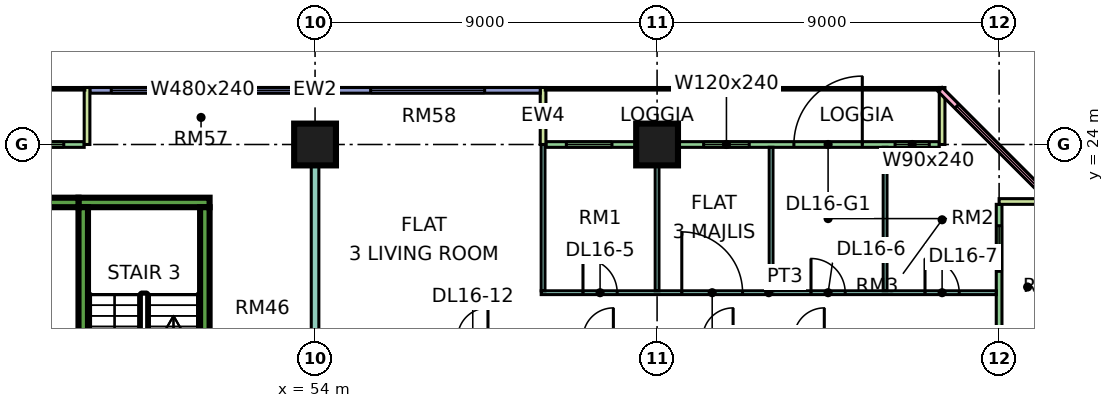
"""IFC4 building model, lengths in metres.
Left out: names, types, materials, properties, quantities, classifications, styles, units other than length and angle.
Written with IfcOpenShell. Run it as: python <this file> out.ifc"""

import sys

from ifc_helpers import new_model, si_unit, direction, frame, frame_2d, origin, origin_2d, place, context, subcontext, project, spatial, rectangle, extrude, element, fill, save


model = new_model("IFC4")
c1 = context("Model", 3, precision=1e-05, world=origin(), true_north=direction((0.0, 1.0)))
c2 = subcontext(c1, "Body", "Model", "MODEL_VIEW")
j1 = project(units=[si_unit("LENGTHUNIT", "METRE"), si_unit("PLANEANGLEUNIT", "RADIAN")], contexts=[c1])
p1 = place(None, origin())
s1 = spatial("IfcSite", under=j1, at=p1, CompositionType="ELEMENT")
p2 = place(p1, origin())
s2 = spatial("IfcBuilding", under=s1, at=p2, CompositionType="ELEMENT")
p3 = place(p2, frame((0.0, 0.0, 75.15)))
s3 = spatial("IfcBuildingStorey", under=s2, at=p3, CompositionType="ELEMENT", Elevation=75.15)
for number, where, z_axis, x_axis in (
    (1, (54.0, 24.0, 0.0), (0.0, 0.0, 1.0), (1.0, 0.0, 0.0)),
    (2, (63.0, 24.0, 0.0), (0.0, 0.0, 1.0), (1.0, 0.0, 0.0)),
):
    element("IfcColumn", number, at=place(p3, frame(where, z_axis=z_axis, x_axis=x_axis)), inside=s3, PredefinedType="COLUMN", context=c2, shape_type="SweptSolid", body=[
        extrude(rectangle(XDim=1.1, YDim=1.1, at=origin_2d()), origin(), (0.0, 0.0, 1.0), 3.75),
    ])
p4 = place(p3, frame((47.775, 22.475, 0.0), z_axis=(0.0, 0.0, 1.0), x_axis=(1.0, 0.0, 0.0)))
e3 = element("IfcWall", 3, at=p4, inside=s3, PredefinedType="SHEAR", context=c2, shape_type="SweptSolid", body=[
    extrude(rectangle(XDim=3.45, YDim=0.25, at=frame_2d((1.725, 0.0))), origin(), (0.0, 0.0, 1.0), 3.75),
])
p5 = place(p3, frame((47.9, 15.85, 0.0), z_axis=(0.0, 0.0, 1.0), x_axis=(0.0, 1.0, 0.0)))
e4 = element("IfcWall", 4, at=p5, inside=s3, PredefinedType="SHEAR", context=c2, shape_type="SweptSolid", body=[
    extrude(rectangle(XDim=6.5, YDim=0.25, at=frame_2d((3.25, 0.0))), origin(), (0.0, 0.0, 1.0), 3.75),
])
p6 = place(p5, frame((0.35, 0.0, 0.0)))
e5 = element("IfcOpeningElement", 5, at=p6, cuts=e4, PredefinedType="OPENING", context=c2, shape_type="SweptSolid", body=[
    extrude(rectangle(XDim=1.1, YDim=2.2, at=frame_2d((0.55, 1.1))), frame((0.0, 0.135, 0.0), z_axis=(0.0, -1.0, 0.0), x_axis=(1.0, 0.0, 0.0)), (0.0, 0.0, 1.0), 0.27),
])
p7 = place(p3, frame((51.1, 15.85, 0.0), z_axis=(0.0, 0.0, 1.0), x_axis=(0.0, 1.0, 0.0)))
e6 = element("IfcWall", 6, at=p7, inside=s3, PredefinedType="SHEAR", context=c2, shape_type="SweptSolid", body=[
    extrude(rectangle(XDim=6.5, YDim=0.25, at=frame_2d((3.25, 0.0))), origin(), (0.0, 0.0, 1.0), 3.75),
])
p8 = place(p3, frame((44.35, 22.475, 0.0), z_axis=(0.0, 0.0, 1.0), x_axis=(1.0, 0.0, 0.0)))
e7 = element("IfcWall", 7, at=p8, inside=s3, PredefinedType="SHEAR", context=c2, shape_type="SweptSolid", body=[
    extrude(rectangle(XDim=3.425, YDim=0.25, at=frame_2d((1.712, 0.0))), origin(), (0.0, 0.0, 1.0), 3.75),
])
p9 = place(p3, frame((70.425, 24.0, 0.0), z_axis=(0.0, 0.0, 1.0), x_axis=(-1.0, 0.0, 0.0)))
e8 = element("IfcWall", 8, at=p9, inside=s3, PredefinedType="SOLIDWALL", context=c2, shape_type="SweptSolid", body=[
    extrude(rectangle(XDim=10.35, YDim=0.15, at=frame_2d((5.175, 0.0))), origin(), (0.0, 0.0, 1.0), 3.35),
])
p10 = place(p9, frame((0.262, 0.0, 0.45)))
e9 = element("IfcOpeningElement", 9, at=p10, cuts=e8, PredefinedType="OPENING", context=c2, shape_type="SweptSolid", body=[
    extrude(rectangle(XDim=0.9, YDim=2.4, at=frame_2d((0.45, 1.2))), frame((0.0, 0.085, 0.0), z_axis=(0.0, -1.0, 0.0), x_axis=(1.0, 0.0, 0.0)), (0.0, 0.0, 1.0), 0.17),
])
p11 = place(p9, frame((2.025, 0.0, 0.0)))
e10 = element("IfcOpeningElement", 10, at=p11, cuts=e8, PredefinedType="OPENING", context=c2, shape_type="SweptSolid", body=[
    extrude(rectangle(XDim=1.8, YDim=2.4, at=frame_2d((0.9, 1.2))), frame((0.0, 0.085, 0.0), z_axis=(0.0, -1.0, 0.0), x_axis=(1.0, 0.0, 0.0)), (0.0, 0.0, 1.0), 0.17),
])
p12 = place(p9, frame((5.0, 0.0, 0.45)))
e11 = element("IfcOpeningElement", 11, at=p12, cuts=e8, PredefinedType="OPENING", context=c2, shape_type="SweptSolid", body=[
    extrude(rectangle(XDim=1.2, YDim=2.4, at=frame_2d((0.6, 1.2))), frame((0.0, 0.085, 0.0), z_axis=(0.0, -1.0, 0.0), x_axis=(1.0, 0.0, 0.0)), (0.0, 0.0, 1.0), 0.17),
])
p13 = place(p9, frame((8.613, 0.0, 0.45)))
e12 = element("IfcOpeningElement", 12, at=p13, cuts=e8, PredefinedType="OPENING", context=c2, shape_type="SweptSolid", body=[
    extrude(rectangle(XDim=1.2, YDim=2.4, at=frame_2d((0.6, 1.2))), frame((0.0, 0.085, 0.0), z_axis=(0.0, -1.0, 0.0), x_axis=(1.0, 0.0, 0.0)), (0.0, 0.0, 1.0), 0.17),
])
for number, where, z_axis, x_axis in (
    (13, (70.5, 25.5, 0.0), (0.0, 0.0, 1.0), (0.0, -1.0, 0.0)),
    (14, (60.0, 25.5, 0.0), (0.0, 0.0, 1.0), (0.0, -1.0, 0.0)),
):
    element("IfcWall", number, at=place(p3, frame(where, z_axis=z_axis, x_axis=x_axis)), inside=s3, PredefinedType="SOLIDWALL", context=c2, shape_type="SweptSolid", body=[
        extrude(rectangle(XDim=1.5, YDim=0.15, at=frame_2d((0.75, 0.0))), origin(), (0.0, 0.0, 1.0), 3.35),
    ])
p14 = place(p3, frame((59.925, 25.425, 0.0), z_axis=(0.0, 0.0, 1.0), x_axis=(-1.0, 0.0, 0.0)))
e15 = element("IfcWall", 15, at=p14, inside=s3, PredefinedType="SOLIDWALL", context=c2, shape_type="SweptSolid", body=[
    extrude(rectangle(XDim=11.85, YDim=0.15, at=frame_2d((5.925, 0.0))), origin(), (0.0, 0.0, 1.0), 3.35),
])
p15 = place(p14, frame((1.462, 0.0, 0.45)))
e16 = element("IfcOpeningElement", 16, at=p15, cuts=e15, PredefinedType="OPENING", context=c2, shape_type="SweptSolid", body=[
    extrude(rectangle(XDim=3.0, YDim=2.4, at=frame_2d((1.5, 1.2))), frame((0.0, 0.085, 0.0), z_axis=(0.0, -1.0, 0.0), x_axis=(1.0, 0.0, 0.0)), (0.0, 0.0, 1.0), 0.17),
])
p16 = place(p14, frame((6.488, 0.0, 0.45)))
e17 = element("IfcOpeningElement", 17, at=p16, cuts=e15, PredefinedType="OPENING", context=c2, shape_type="SweptSolid", body=[
    extrude(rectangle(XDim=4.8, YDim=2.4, at=frame_2d((2.4, 1.2))), frame((0.0, 0.085, 0.0), z_axis=(0.0, -1.0, 0.0), x_axis=(1.0, 0.0, 0.0)), (0.0, 0.0, 1.0), 0.17),
])
p17 = place(p3, frame((47.925, 24.0, 0.0), z_axis=(0.0, 0.0, 1.0), x_axis=(-1.0, 0.0, 0.0)))
e18 = element("IfcWall", 18, at=p17, inside=s3, PredefinedType="SOLIDWALL", context=c2, shape_type="SweptSolid", body=[
    extrude(rectangle(XDim=7.35, YDim=0.15, at=frame_2d((3.675, 0.0))), origin(), (0.0, 0.0, 1.0), 3.35),
])
p18 = place(p17, frame((0.538, 0.0, 0.45)))
e19 = element("IfcOpeningElement", 19, at=p18, cuts=e18, PredefinedType="OPENING", context=c2, shape_type="SweptSolid", body=[
    extrude(rectangle(XDim=1.2, YDim=2.4, at=frame_2d((0.6, 1.2))), frame((0.0, 0.085, 0.0), z_axis=(0.0, -1.0, 0.0), x_axis=(1.0, 0.0, 0.0)), (0.0, 0.0, 1.0), 0.17),
])
p19 = place(p17, frame((3.962, 0.0, 0.45)))
e20 = element("IfcOpeningElement", 20, at=p19, cuts=e18, PredefinedType="OPENING", context=c2, shape_type="SweptSolid", body=[
    extrude(rectangle(XDim=3.0, YDim=2.4, at=frame_2d((1.5, 1.2))), frame((0.0, 0.085, 0.0), z_axis=(0.0, -1.0, 0.0), x_axis=(1.0, 0.0, 0.0)), (0.0, 0.0, 1.0), 0.17),
])
p20 = place(p3, frame((48.0, 25.5, 0.0), z_axis=(0.0, 0.0, 1.0), x_axis=(0.0, -1.0, 0.0)))
e21 = element("IfcWall", 21, at=p20, inside=s3, PredefinedType="SOLIDWALL", context=c2, shape_type="SweptSolid", body=[
    extrude(rectangle(XDim=1.5, YDim=0.15, at=frame_2d((0.75, 0.0))), origin(), (0.0, 0.0, 1.0), 3.35),
])
p21 = place(p3, frame((72.0, 12.075, 0.0), z_axis=(0.0, 0.0, 1.0), x_axis=(0.0, 1.0, 0.0)))
e22 = element("IfcWall", 22, at=p21, inside=s3, PredefinedType="SOLIDWALL", context=c2, shape_type="SweptSolid", body=[
    extrude(rectangle(XDim=10.35, YDim=0.15, at=frame_2d((5.175, 0.0))), origin(), (0.0, 0.0, 1.0), 3.35),
])
p22 = place(p21, frame((3.975, 0.0, 0.45)))
e23 = element("IfcOpeningElement", 23, at=p22, cuts=e22, PredefinedType="OPENING", context=c2, shape_type="SweptSolid", body=[
    extrude(rectangle(XDim=2.4, YDim=2.4, at=frame_2d((1.2, 1.2))), frame((0.0, 0.085, 0.0), z_axis=(0.0, -1.0, 0.0), x_axis=(1.0, 0.0, 0.0)), (0.0, 0.0, 1.0), 0.17),
])
p23 = place(p21, frame((8.587, 0.0, 0.45)))
e24 = element("IfcOpeningElement", 24, at=p23, cuts=e22, PredefinedType="OPENING", context=c2, shape_type="SweptSolid", body=[
    extrude(rectangle(XDim=1.2, YDim=2.4, at=frame_2d((0.6, 1.2))), frame((0.0, 0.085, 0.0), z_axis=(0.0, -1.0, 0.0), x_axis=(1.0, 0.0, 0.0)), (0.0, 0.0, 1.0), 0.17),
])
p24 = place(p3, frame((73.5, 22.5, 0.0), z_axis=(0.0, 0.0, 1.0), x_axis=(-1.0, 0.0, 0.0)))
e25 = element("IfcWall", 25, at=p24, inside=s3, PredefinedType="SOLIDWALL", context=c2, shape_type="SweptSolid", body=[
    extrude(rectangle(XDim=1.5, YDim=0.15, at=frame_2d((0.75, 0.0))), origin(), (0.0, 0.0, 1.0), 3.35),
])
p25 = place(p3, frame((73.447, 22.447, 0.0), z_axis=(0.0, 0.0, 1.0), x_axis=(-0.707106781187, 0.707106781187, 0.0)))
e26 = element("IfcWall", 26, at=p25, inside=s3, PredefinedType="SOLIDWALL", context=c2, shape_type="SweptSolid", body=[
    extrude(rectangle(XDim=4.243, YDim=0.15, at=frame_2d((2.121, 0.0))), origin(), (0.0, 0.0, 1.0), 3.35),
])
p26 = place(p25, frame((0.621, 0.0, 0.45)))
e27 = element("IfcOpeningElement", 27, at=p26, cuts=e26, PredefinedType="OPENING", context=c2, shape_type="SweptSolid", body=[
    extrude(rectangle(XDim=3.0, YDim=2.4, at=frame_2d((1.5, 1.2))), frame((0.0, 0.085, 0.0), z_axis=(0.0, -1.0, 0.0), x_axis=(1.0, 0.0, 0.0)), (0.0, 0.0, 1.0), 0.17),
])
p27 = place(p3, frame((54.0, 15.7, 0.0), z_axis=(0.0, 0.0, 1.0), x_axis=(0.0, 1.0, 0.0)))
e28 = element("IfcWall", 28, at=p27, inside=s3, PredefinedType="PARTITIONING", context=c2, shape_type="SweptSolid", body=[
    extrude(rectangle(XDim=8.3, YDim=0.2, at=frame_2d((4.15, 0.0))), origin(), (0.0, 0.0, 1.0), 3.35),
])
p28 = place(p3, frame((59.95, 20.1, 0.0), z_axis=(0.0, 0.0, 1.0), x_axis=(1.0, 0.0, 0.0)))
e29 = element("IfcWall", 29, at=p28, inside=s3, PredefinedType="PARTITIONING", context=c2, shape_type="SweptSolid", body=[
    extrude(rectangle(XDim=11.976, YDim=0.1, at=frame_2d((5.988, 0.0))), origin(), (0.0, 0.0, 1.0), 3.35),
])
p29 = place(p28, frame((1.1, 0.0, 0.0)))
e30 = element("IfcOpeningElement", 30, at=p29, cuts=e29, PredefinedType="OPENING", context=c2, shape_type="SweptSolid", body=[
    extrude(rectangle(XDim=0.9, YDim=2.1, at=frame_2d((0.45, 1.05))), frame((0.0, 0.06, 0.0), z_axis=(0.0, -1.0, 0.0), x_axis=(1.0, 0.0, 0.0)), (0.0, 0.0, 1.0), 0.12),
])
p30 = place(p28, frame((7.1, 0.0, 0.0)))
e31 = element("IfcOpeningElement", 31, at=p30, cuts=e29, PredefinedType="OPENING", context=c2, shape_type="SweptSolid", body=[
    extrude(rectangle(XDim=0.9, YDim=2.1, at=frame_2d((0.45, 1.05))), frame((0.0, 0.06, 0.0), z_axis=(0.0, -1.0, 0.0), x_axis=(1.0, 0.0, 0.0)), (0.0, 0.0, 1.0), 0.12),
])
p31 = place(p28, frame((10.1, 0.0, 0.0)))
e32 = element("IfcOpeningElement", 32, at=p31, cuts=e29, PredefinedType="OPENING", context=c2, shape_type="SweptSolid", body=[
    extrude(rectangle(XDim=0.9, YDim=2.1, at=frame_2d((0.45, 1.05))), frame((0.0, 0.06, 0.0), z_axis=(0.0, -1.0, 0.0), x_axis=(1.0, 0.0, 0.0)), (0.0, 0.0, 1.0), 0.12),
])
p32 = place(p28, frame((3.7, 0.0, 0.0)))
e33 = element("IfcOpeningElement", 33, at=p32, cuts=e29, PredefinedType="OPENING", context=c2, shape_type="SweptSolid", body=[
    extrude(rectangle(XDim=1.6, YDim=2.1, at=frame_2d((0.8, 1.05))), frame((0.0, 0.06, 0.0), z_axis=(0.0, -1.0, 0.0), x_axis=(1.0, 0.0, 0.0)), (0.0, 0.0, 1.0), 0.12),
])
p33 = place(p3, frame((60.0, 20.15, 0.0), z_axis=(0.0, 0.0, 1.0), x_axis=(0.0, 1.0, 0.0)))
e34 = element("IfcWall", 34, at=p33, inside=s3, PredefinedType="PARTITIONING", context=c2, shape_type="SweptSolid", body=[
    extrude(rectangle(XDim=3.85, YDim=0.1, at=frame_2d((1.925, 0.0))), origin(), (0.0, 0.0, 1.0), 3.35),
])
for number, where, z_axis, x_axis in (
    (35, (63.0, 20.15, 0.0), (0.0, 0.0, 1.0), (0.0, 1.0, 0.0)),
    (36, (66.0, 20.15, 0.0), (0.0, 0.0, 1.0), (0.0, 1.0, 0.0)),
    (37, (69.0, 20.15, 0.0), (0.0, 0.0, 1.0), (0.0, 1.0, 0.0)),
):
    element("IfcWall", number, at=place(p3, frame(where, z_axis=z_axis, x_axis=x_axis)), inside=s3, PredefinedType="PARTITIONING", context=c2, shape_type="SweptSolid", body=[
        extrude(rectangle(XDim=3.776, YDim=0.1, at=frame_2d((1.888, 0.0))), origin(), (0.0, 0.0, 1.0), 3.35),
    ])
p34 = place(p10, origin())
e38 = element("IfcWindow", 38, at=p34, inside=s3, PartitioningType="SINGLE_PANEL", PredefinedType="WINDOW", context=c2, shape_type="SweptSolid", body=[
    extrude(rectangle(XDim=0.9, YDim=2.4, at=frame_2d((0.45, 1.2))), frame((0.0, 0.03, 0.0), z_axis=(0.0, -1.0, 0.0), x_axis=(1.0, 0.0, 0.0)), (0.0, 0.0, 1.0), 0.06),
])
fill(e9, e38)
p35 = place(p11, frame((1.8, 0.0, 0.0), z_axis=(0.0, 0.0, 1.0), x_axis=(-1.0, 0.0, 0.0)))
e39 = element("IfcDoor", 39, at=p35, inside=s3, OperationType="DOUBLE_DOOR_SINGLE_SWING", PredefinedType="DOOR", context=c2, shape_type="SweptSolid", body=[
    extrude(rectangle(XDim=1.8, YDim=2.4, at=frame_2d((0.9, 1.2))), frame((0.0, 0.025, 0.0), z_axis=(0.0, -1.0, 0.0), x_axis=(1.0, 0.0, 0.0)), (0.0, 0.0, 1.0), 0.05),
])
fill(e10, e39)
p36 = place(p12, origin())
e40 = element("IfcWindow", 40, at=p36, inside=s3, PartitioningType="SINGLE_PANEL", PredefinedType="WINDOW", context=c2, shape_type="SweptSolid", body=[
    extrude(rectangle(XDim=1.2, YDim=2.4, at=frame_2d((0.6, 1.2))), frame((0.0, 0.03, 0.0), z_axis=(0.0, -1.0, 0.0), x_axis=(1.0, 0.0, 0.0)), (0.0, 0.0, 1.0), 0.06),
])
fill(e11, e40)
p37 = place(p13, origin())
e41 = element("IfcWindow", 41, at=p37, inside=s3, PartitioningType="SINGLE_PANEL", PredefinedType="WINDOW", context=c2, shape_type="SweptSolid", body=[
    extrude(rectangle(XDim=1.2, YDim=2.4, at=frame_2d((0.6, 1.2))), frame((0.0, 0.03, 0.0), z_axis=(0.0, -1.0, 0.0), x_axis=(1.0, 0.0, 0.0)), (0.0, 0.0, 1.0), 0.06),
])
fill(e12, e41)
p38 = place(p15, origin())
e42 = element("IfcWindow", 42, at=p38, inside=s3, PartitioningType="SINGLE_PANEL", PredefinedType="WINDOW", context=c2, shape_type="SweptSolid", body=[
    extrude(rectangle(XDim=3.0, YDim=2.4, at=frame_2d((1.5, 1.2))), frame((0.0, 0.03, 0.0), z_axis=(0.0, -1.0, 0.0), x_axis=(1.0, 0.0, 0.0)), (0.0, 0.0, 1.0), 0.06),
])
fill(e16, e42)
p39 = place(p16, origin())
e43 = element("IfcWindow", 43, at=p39, inside=s3, PartitioningType="SINGLE_PANEL", PredefinedType="WINDOW", context=c2, shape_type="SweptSolid", body=[
    extrude(rectangle(XDim=4.8, YDim=2.4, at=frame_2d((2.4, 1.2))), frame((0.0, 0.03, 0.0), z_axis=(0.0, -1.0, 0.0), x_axis=(1.0, 0.0, 0.0)), (0.0, 0.0, 1.0), 0.06),
])
fill(e17, e43)
p40 = place(p18, origin())
e44 = element("IfcWindow", 44, at=p40, inside=s3, PartitioningType="SINGLE_PANEL", PredefinedType="WINDOW", context=c2, shape_type="SweptSolid", body=[
    extrude(rectangle(XDim=1.2, YDim=2.4, at=frame_2d((0.6, 1.2))), frame((0.0, 0.03, 0.0), z_axis=(0.0, -1.0, 0.0), x_axis=(1.0, 0.0, 0.0)), (0.0, 0.0, 1.0), 0.06),
])
fill(e19, e44)
p41 = place(p23, origin())
e45 = element("IfcWindow", 45, at=p41, inside=s3, PartitioningType="SINGLE_PANEL", PredefinedType="WINDOW", context=c2, shape_type="SweptSolid", body=[
    extrude(rectangle(XDim=1.2, YDim=2.4, at=frame_2d((0.6, 1.2))), frame((0.0, 0.03, 0.0), z_axis=(0.0, -1.0, 0.0), x_axis=(1.0, 0.0, 0.0)), (0.0, 0.0, 1.0), 0.06),
])
fill(e24, e45)
p42 = place(p26, origin())
e46 = element("IfcWindow", 46, at=p42, inside=s3, PartitioningType="SINGLE_PANEL", PredefinedType="WINDOW", context=c2, shape_type="SweptSolid", body=[
    extrude(rectangle(XDim=3.0, YDim=2.4, at=frame_2d((1.5, 1.2))), frame((0.0, 0.03, 0.0), z_axis=(0.0, -1.0, 0.0), x_axis=(1.0, 0.0, 0.0)), (0.0, 0.0, 1.0), 0.06),
])
fill(e27, e46)
p43 = place(p29, origin())
e47 = element("IfcDoor", 47, at=p43, inside=s3, OperationType="SINGLE_SWING_LEFT", PredefinedType="DOOR", context=c2, shape_type="SweptSolid", body=[
    extrude(rectangle(XDim=0.9, YDim=2.1, at=frame_2d((0.45, 1.05))), frame((0.0, 0.025, 0.0), z_axis=(0.0, -1.0, 0.0), x_axis=(1.0, 0.0, 0.0)), (0.0, 0.0, 1.0), 0.05),
])
fill(e30, e47)
p44 = place(p30, origin())
e48 = element("IfcDoor", 48, at=p44, inside=s3, OperationType="SINGLE_SWING_LEFT", PredefinedType="DOOR", context=c2, shape_type="SweptSolid", body=[
    extrude(rectangle(XDim=0.9, YDim=2.1, at=frame_2d((0.45, 1.05))), frame((0.0, 0.025, 0.0), z_axis=(0.0, -1.0, 0.0), x_axis=(1.0, 0.0, 0.0)), (0.0, 0.0, 1.0), 0.05),
])
fill(e31, e48)
p45 = place(p31, origin())
e49 = element("IfcDoor", 49, at=p45, inside=s3, OperationType="SINGLE_SWING_LEFT", PredefinedType="DOOR", context=c2, shape_type="SweptSolid", body=[
    extrude(rectangle(XDim=0.9, YDim=2.1, at=frame_2d((0.45, 1.05))), frame((0.0, 0.025, 0.0), z_axis=(0.0, -1.0, 0.0), x_axis=(1.0, 0.0, 0.0)), (0.0, 0.0, 1.0), 0.05),
])
fill(e32, e49)
p46 = place(p32, origin())
e50 = element("IfcDoor", 50, at=p46, inside=s3, OperationType="DOUBLE_DOOR_SINGLE_SWING", PredefinedType="DOOR", context=c2, shape_type="SweptSolid", body=[
    extrude(rectangle(XDim=1.6, YDim=2.1, at=frame_2d((0.8, 1.05))), frame((0.0, 0.025, 0.0), z_axis=(0.0, -1.0, 0.0), x_axis=(1.0, 0.0, 0.0)), (0.0, 0.0, 1.0), 0.05),
])
fill(e33, e50)
save(model, sys.argv[1])
